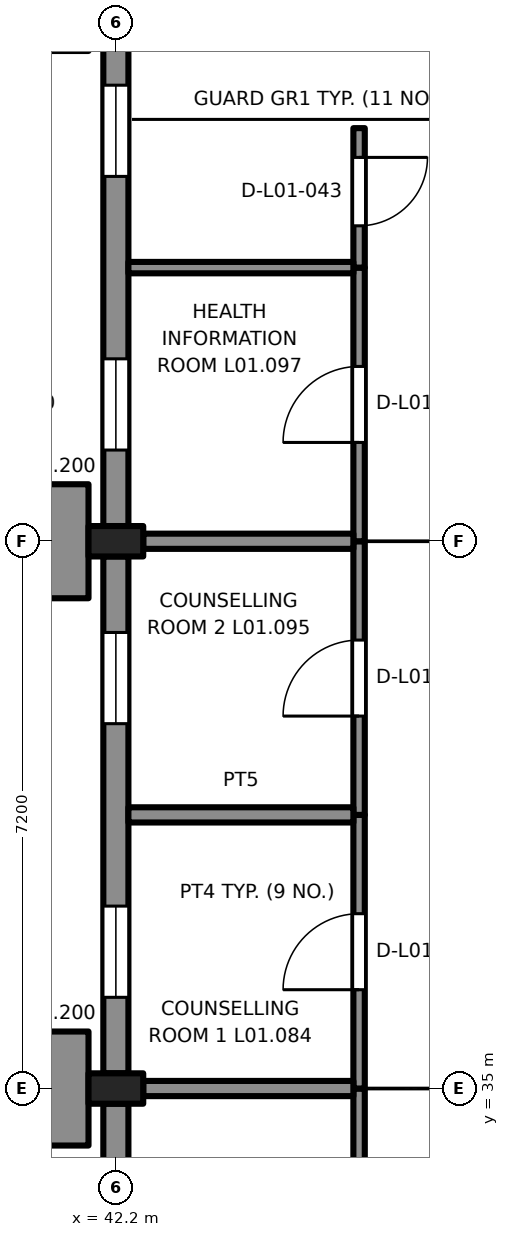
"""IFC4 building model, lengths in metres.
Left out: names, types, materials, properties, quantities, classifications, styles, units other than length and angle.
Written with IfcOpenShell. Run it as: python <this file> out.ifc"""

import sys

from ifc_helpers import new_model, si_unit, direction, frame, frame_2d, origin, origin_2d, place, context, subcontext, project, spatial, rectangle, extrude, element, fill, save


model = new_model("IFC4")
c1 = context("Model", 3, precision=1e-05, world=origin(), true_north=direction((0.0, 1.0)))
c2 = subcontext(c1, "Body", "Model", "MODEL_VIEW")
j1 = project(units=[si_unit("LENGTHUNIT", "METRE"), si_unit("PLANEANGLEUNIT", "RADIAN")], contexts=[c1])
p1 = place(None, origin())
s1 = spatial("IfcSite", under=j1, at=p1, CompositionType="ELEMENT")
p2 = place(p1, origin())
s2 = spatial("IfcBuilding", under=s1, at=p2, CompositionType="ELEMENT")
p3 = place(p2, frame((0.0, 0.0, 6.3)))
s3 = spatial("IfcBuildingStorey", under=s2, at=p3, CompositionType="ELEMENT", Elevation=6.3)
for number, where, z_axis, x_axis in (
    (1, (42.2, 35.0, 0.0), (0.0, 0.0, 1.0), (0.0, 1.0, 0.0)),
    (2, (42.2, 42.2, 0.0), (0.0, 0.0, 1.0), (0.0, 1.0, 0.0)),
):
    element("IfcColumn", number, at=place(p3, frame(where, z_axis=z_axis, x_axis=x_axis)), inside=s3, PredefinedType="COLUMN", context=c2, shape_type="SweptSolid", body=[
        extrude(rectangle(XDim=0.4, YDim=0.72, at=origin_2d()), origin(), (0.0, 0.0, 1.0), 3.9),
    ])
p4 = place(p3, frame((42.2, 28.0, 0.0), z_axis=(0.0, 0.0, 1.0), x_axis=(0.0, 1.0, 0.0)))
e3 = element("IfcWall", 3, at=p4, inside=s3, PredefinedType="SOLIDWALL", context=c2, shape_type="SweptSolid", body=[
    extrude(rectangle(XDim=6.8, YDim=0.33, at=frame_2d((3.4, 0.0))), origin(), (0.0, 0.0, 1.0), 3.3),
])
p5 = place(p4, frame((1.0, 0.0, 0.6)))
e4 = element("IfcOpeningElement", 4, at=p5, cuts=e3, PredefinedType="OPENING", context=c2, shape_type="SweptSolid", body=[
    extrude(rectangle(XDim=1.2, YDim=2.4, at=frame_2d((0.6, 1.2))), frame((0.0, 0.175, 0.0), z_axis=(0.0, -1.0, 0.0), x_axis=(1.0, 0.0, 0.0)), (0.0, 0.0, 1.0), 0.35),
])
p6 = place(p4, frame((4.6, 0.0, 0.6)))
e5 = element("IfcOpeningElement", 5, at=p6, cuts=e3, PredefinedType="OPENING", context=c2, shape_type="SweptSolid", body=[
    extrude(rectangle(XDim=1.2, YDim=2.4, at=frame_2d((0.6, 1.2))), frame((0.0, 0.175, 0.0), z_axis=(0.0, -1.0, 0.0), x_axis=(1.0, 0.0, 0.0)), (0.0, 0.0, 1.0), 0.35),
])
p7 = place(p3, frame((42.2, 35.2, 0.0), z_axis=(0.0, 0.0, 1.0), x_axis=(0.0, 1.0, 0.0)))
e6 = element("IfcWall", 6, at=p7, inside=s3, PredefinedType="SOLIDWALL", context=c2, shape_type="SweptSolid", body=[
    extrude(rectangle(XDim=6.8, YDim=0.33, at=frame_2d((3.4, 0.0))), origin(), (0.0, 0.0, 1.0), 3.3),
])
p8 = place(p7, frame((1.0, 0.0, 0.6)))
e7 = element("IfcOpeningElement", 7, at=p8, cuts=e6, PredefinedType="OPENING", context=c2, shape_type="SweptSolid", body=[
    extrude(rectangle(XDim=1.2, YDim=2.4, at=frame_2d((0.6, 1.2))), frame((0.0, 0.175, 0.0), z_axis=(0.0, -1.0, 0.0), x_axis=(1.0, 0.0, 0.0)), (0.0, 0.0, 1.0), 0.35),
])
p9 = place(p7, frame((4.6, 0.0, 0.6)))
e8 = element("IfcOpeningElement", 8, at=p9, cuts=e6, PredefinedType="OPENING", context=c2, shape_type="SweptSolid", body=[
    extrude(rectangle(XDim=1.2, YDim=2.4, at=frame_2d((0.6, 1.2))), frame((0.0, 0.175, 0.0), z_axis=(0.0, -1.0, 0.0), x_axis=(1.0, 0.0, 0.0)), (0.0, 0.0, 1.0), 0.35),
])
p10 = place(p3, frame((42.2, 42.4, 0.0), z_axis=(0.0, 0.0, 1.0), x_axis=(0.0, 1.0, 0.0)))
e9 = element("IfcWall", 9, at=p10, inside=s3, PredefinedType="SOLIDWALL", context=c2, shape_type="SweptSolid", body=[
    extrude(rectangle(XDim=6.8, YDim=0.33, at=frame_2d((3.4, 0.0))), origin(), (0.0, 0.0, 1.0), 3.3),
])
p11 = place(p10, frame((1.0, 0.0, 0.6)))
e10 = element("IfcOpeningElement", 10, at=p11, cuts=e9, PredefinedType="OPENING", context=c2, shape_type="SweptSolid", body=[
    extrude(rectangle(XDim=1.2, YDim=2.4, at=frame_2d((0.6, 1.2))), frame((0.0, 0.175, 0.0), z_axis=(0.0, -1.0, 0.0), x_axis=(1.0, 0.0, 0.0)), (0.0, 0.0, 1.0), 0.35),
])
p12 = place(p10, frame((4.6, 0.0, 0.6)))
e11 = element("IfcOpeningElement", 11, at=p12, cuts=e9, PredefinedType="OPENING", context=c2, shape_type="SweptSolid", body=[
    extrude(rectangle(XDim=1.2, YDim=2.4, at=frame_2d((0.6, 1.2))), frame((0.0, 0.175, 0.0), z_axis=(0.0, -1.0, 0.0), x_axis=(1.0, 0.0, 0.0)), (0.0, 0.0, 1.0), 0.35),
])
for number, where, z_axis, x_axis in (
    (12, (41.29, 34.25, 0.0), (0.0, 0.0, 1.0), (0.0, 1.0, 0.0)),
    (13, (41.29, 41.45, 0.0), (0.0, 0.0, 1.0), (0.0, 1.0, 0.0)),
):
    element("IfcWall", number, at=place(p3, frame(where, z_axis=z_axis, x_axis=x_axis)), inside=s3, PredefinedType="SOLIDWALL", context=c2, shape_type="SweptSolid", body=[
        extrude(rectangle(XDim=1.5, YDim=1.1, at=frame_2d((0.75, 0.0))), origin(), (0.0, 0.0, 1.0), 3.9),
    ])
p13 = place(p3, frame((45.4, 27.8, 0.0), z_axis=(0.0, 0.0, 1.0), x_axis=(0.0, 1.0, 0.0)))
e14 = element("IfcWall", 14, at=p13, inside=s3, PredefinedType="PARTITIONING", context=c2, shape_type="SweptSolid", body=[
    extrude(rectangle(XDim=7.2, YDim=0.15, at=frame_2d((3.6, 0.0))), origin(), (0.0, 0.0, 1.0), 6.201),
])
p14 = place(p13, frame((1.3, 0.0, 0.0)))
e15 = element("IfcOpeningElement", 15, at=p14, cuts=e14, PredefinedType="OPENING", context=c2, shape_type="SweptSolid", body=[
    extrude(rectangle(XDim=1.0, YDim=2.1, at=frame_2d((0.5, 1.05))), frame((0.0, 0.085, 0.0), z_axis=(0.0, -1.0, 0.0), x_axis=(1.0, 0.0, 0.0)), (0.0, 0.0, 1.0), 0.17),
])
p15 = place(p3, frame((45.4, 35.0, 0.0), z_axis=(0.0, 0.0, 1.0), x_axis=(0.0, 1.0, 0.0)))
e16 = element("IfcWall", 16, at=p15, inside=s3, PredefinedType="PARTITIONING", context=c2, shape_type="SweptSolid", body=[
    extrude(rectangle(XDim=3.6, YDim=0.15, at=frame_2d((1.8, 0.0))), origin(), (0.0, 0.0, 1.0), 6.201),
])
p16 = place(p15, frame((1.3, 0.0, 0.0)))
e17 = element("IfcOpeningElement", 17, at=p16, cuts=e16, PredefinedType="OPENING", context=c2, shape_type="SweptSolid", body=[
    extrude(rectangle(XDim=1.0, YDim=2.1, at=frame_2d((0.5, 1.05))), frame((0.0, 0.085, 0.0), z_axis=(0.0, -1.0, 0.0), x_axis=(1.0, 0.0, 0.0)), (0.0, 0.0, 1.0), 0.17),
])
p17 = place(p3, frame((42.56, 35.0, 0.0), z_axis=(0.0, 0.0, 1.0), x_axis=(1.0, 0.0, 0.0)))
e18 = element("IfcWall", 18, at=p17, inside=s3, PredefinedType="PARTITIONING", context=c2, shape_type="SweptSolid", body=[
    extrude(rectangle(XDim=2.765, YDim=0.2, at=frame_2d((1.382, 0.0))), origin(), (0.0, 0.0, 1.0), 3.9),
])
p18 = place(p3, frame((45.4, 38.6, 0.0), z_axis=(0.0, 0.0, 1.0), x_axis=(0.0, 1.0, 0.0)))
e19 = element("IfcWall", 19, at=p18, inside=s3, PredefinedType="PARTITIONING", context=c2, shape_type="SweptSolid", body=[
    extrude(rectangle(XDim=3.6, YDim=0.15, at=frame_2d((1.8, 0.0))), origin(), (0.0, 0.0, 1.0), 6.201),
])
p19 = place(p18, frame((1.3, 0.0, 0.0)))
e20 = element("IfcOpeningElement", 20, at=p19, cuts=e19, PredefinedType="OPENING", context=c2, shape_type="SweptSolid", body=[
    extrude(rectangle(XDim=1.0, YDim=2.1, at=frame_2d((0.5, 1.05))), frame((0.0, 0.085, 0.0), z_axis=(0.0, -1.0, 0.0), x_axis=(1.0, 0.0, 0.0)), (0.0, 0.0, 1.0), 0.17),
])
p20 = place(p3, frame((42.365, 38.6, 0.0), z_axis=(0.0, 0.0, 1.0), x_axis=(1.0, 0.0, 0.0)))
e21 = element("IfcWall", 21, at=p20, inside=s3, PredefinedType="PARTITIONING", context=c2, shape_type="SweptSolid", body=[
    extrude(rectangle(XDim=2.96, YDim=0.2, at=frame_2d((1.48, 0.0))), origin(), (0.0, 0.0, 1.0), 6.201),
])
p21 = place(p3, frame((45.4, 42.2, 0.0), z_axis=(0.0, 0.0, 1.0), x_axis=(0.0, 1.0, 0.0)))
e22 = element("IfcWall", 22, at=p21, inside=s3, PredefinedType="PARTITIONING", context=c2, shape_type="SweptSolid", body=[
    extrude(rectangle(XDim=3.6, YDim=0.15, at=frame_2d((1.8, 0.0))), origin(), (0.0, 0.0, 1.0), 6.201),
])
p22 = place(p21, frame((1.3, 0.0, 0.0)))
e23 = element("IfcOpeningElement", 23, at=p22, cuts=e22, PredefinedType="OPENING", context=c2, shape_type="SweptSolid", body=[
    extrude(rectangle(XDim=1.0, YDim=2.1, at=frame_2d((0.5, 1.05))), frame((0.0, 0.085, 0.0), z_axis=(0.0, -1.0, 0.0), x_axis=(1.0, 0.0, 0.0)), (0.0, 0.0, 1.0), 0.17),
])
p23 = place(p3, frame((42.56, 42.2, 0.0), z_axis=(0.0, 0.0, 1.0), x_axis=(1.0, 0.0, 0.0)))
e24 = element("IfcWall", 24, at=p23, inside=s3, PredefinedType="PARTITIONING", context=c2, shape_type="SweptSolid", body=[
    extrude(rectangle(XDim=2.765, YDim=0.2, at=frame_2d((1.382, 0.0))), origin(), (0.0, 0.0, 1.0), 3.9),
])
p24 = place(p3, frame((45.4, 47.635, 0.0), z_axis=(0.0, 0.0, 1.0), x_axis=(0.0, -1.0, 0.0)))
e25 = element("IfcWall", 25, at=p24, inside=s3, PredefinedType="PARTITIONING", context=c2, shape_type="SweptSolid", body=[
    extrude(rectangle(XDim=1.835, YDim=0.15, at=frame_2d((0.917, 0.0))), origin(), (0.0, 0.0, 1.0), 6.201),
])
p25 = place(p24, frame((0.385, 0.0, 0.0)))
e26 = element("IfcOpeningElement", 26, at=p25, cuts=e25, PredefinedType="OPENING", context=c2, shape_type="SweptSolid", body=[
    extrude(rectangle(XDim=0.9, YDim=2.1, at=frame_2d((0.45, 1.05))), frame((0.0, 0.085, 0.0), z_axis=(0.0, -1.0, 0.0), x_axis=(1.0, 0.0, 0.0)), (0.0, 0.0, 1.0), 0.17),
])
p26 = place(p3, frame((42.365, 45.8, 0.0), z_axis=(0.0, 0.0, 1.0), x_axis=(1.0, 0.0, 0.0)))
e27 = element("IfcWall", 27, at=p26, inside=s3, PredefinedType="PARTITIONING", context=c2, shape_type="SweptSolid", body=[
    extrude(rectangle(XDim=2.96, YDim=0.15, at=frame_2d((1.48, 0.0))), origin(), (0.0, 0.0, 1.0), 6.201),
])
p27 = place(p8, origin())
e28 = element("IfcWindow", 28, at=p27, inside=s3, PartitioningType="SINGLE_PANEL", PredefinedType="WINDOW", context=c2, shape_type="SweptSolid", body=[
    extrude(rectangle(XDim=1.2, YDim=2.4, at=frame_2d((0.6, 1.2))), frame((0.0, -0.03, 0.0), z_axis=(0.0, -1.0, 0.0), x_axis=(1.0, 0.0, 0.0)), (0.0, 0.0, 1.0), 0.06),
])
fill(e7, e28)
p28 = place(p9, origin())
e29 = element("IfcWindow", 29, at=p28, inside=s3, PartitioningType="SINGLE_PANEL", PredefinedType="WINDOW", context=c2, shape_type="SweptSolid", body=[
    extrude(rectangle(XDim=1.2, YDim=2.4, at=frame_2d((0.6, 1.2))), frame((0.0, -0.03, 0.0), z_axis=(0.0, -1.0, 0.0), x_axis=(1.0, 0.0, 0.0)), (0.0, 0.0, 1.0), 0.06),
])
fill(e8, e29)
p29 = place(p11, origin())
e30 = element("IfcWindow", 30, at=p29, inside=s3, PartitioningType="SINGLE_PANEL", PredefinedType="WINDOW", context=c2, shape_type="SweptSolid", body=[
    extrude(rectangle(XDim=1.2, YDim=2.4, at=frame_2d((0.6, 1.2))), frame((0.0, -0.03, 0.0), z_axis=(0.0, -1.0, 0.0), x_axis=(1.0, 0.0, 0.0)), (0.0, 0.0, 1.0), 0.06),
])
fill(e10, e30)
p30 = place(p12, origin())
e31 = element("IfcWindow", 31, at=p30, inside=s3, PartitioningType="SINGLE_PANEL", PredefinedType="WINDOW", context=c2, shape_type="SweptSolid", body=[
    extrude(rectangle(XDim=1.2, YDim=2.4, at=frame_2d((0.6, 1.2))), frame((0.0, -0.03, 0.0), z_axis=(0.0, -1.0, 0.0), x_axis=(1.0, 0.0, 0.0)), (0.0, 0.0, 1.0), 0.06),
])
fill(e11, e31)
p31 = place(p16, origin())
e32 = element("IfcDoor", 32, at=p31, inside=s3, OperationType="SINGLE_SWING_LEFT", PredefinedType="DOOR", context=c2, shape_type="SweptSolid", body=[
    extrude(rectangle(XDim=1.0, YDim=2.1, at=frame_2d((0.5, 1.05))), frame((0.0, 0.025, 0.0), z_axis=(0.0, -1.0, 0.0), x_axis=(1.0, 0.0, 0.0)), (0.0, 0.0, 1.0), 0.05),
])
fill(e17, e32)
p32 = place(p19, origin())
e33 = element("IfcDoor", 33, at=p32, inside=s3, OperationType="SINGLE_SWING_RIGHT", PredefinedType="DOOR", context=c2, shape_type="SweptSolid", body=[
    extrude(rectangle(XDim=1.0, YDim=2.1, at=frame_2d((0.5, 1.05))), frame((0.0, 0.025, 0.0), z_axis=(0.0, -1.0, 0.0), x_axis=(1.0, 0.0, 0.0)), (0.0, 0.0, 1.0), 0.05),
])
fill(e20, e33)
p33 = place(p22, origin())
e34 = element("IfcDoor", 34, at=p33, inside=s3, OperationType="SINGLE_SWING_LEFT", PredefinedType="DOOR", context=c2, shape_type="SweptSolid", body=[
    extrude(rectangle(XDim=1.0, YDim=2.1, at=frame_2d((0.5, 1.05))), frame((0.0, 0.025, 0.0), z_axis=(0.0, -1.0, 0.0), x_axis=(1.0, 0.0, 0.0)), (0.0, 0.0, 1.0), 0.05),
])
fill(e23, e34)
p34 = place(p25, origin())
e35 = element("IfcDoor", 35, at=p34, inside=s3, OperationType="SINGLE_SWING_LEFT", PredefinedType="DOOR", context=c2, shape_type="SweptSolid", body=[
    extrude(rectangle(XDim=0.9, YDim=2.1, at=frame_2d((0.45, 1.05))), frame((0.0, 0.025, 0.0), z_axis=(0.0, -1.0, 0.0), x_axis=(1.0, 0.0, 0.0)), (0.0, 0.0, 1.0), 0.05),
])
fill(e26, e35)
save(model, sys.argv[1])
